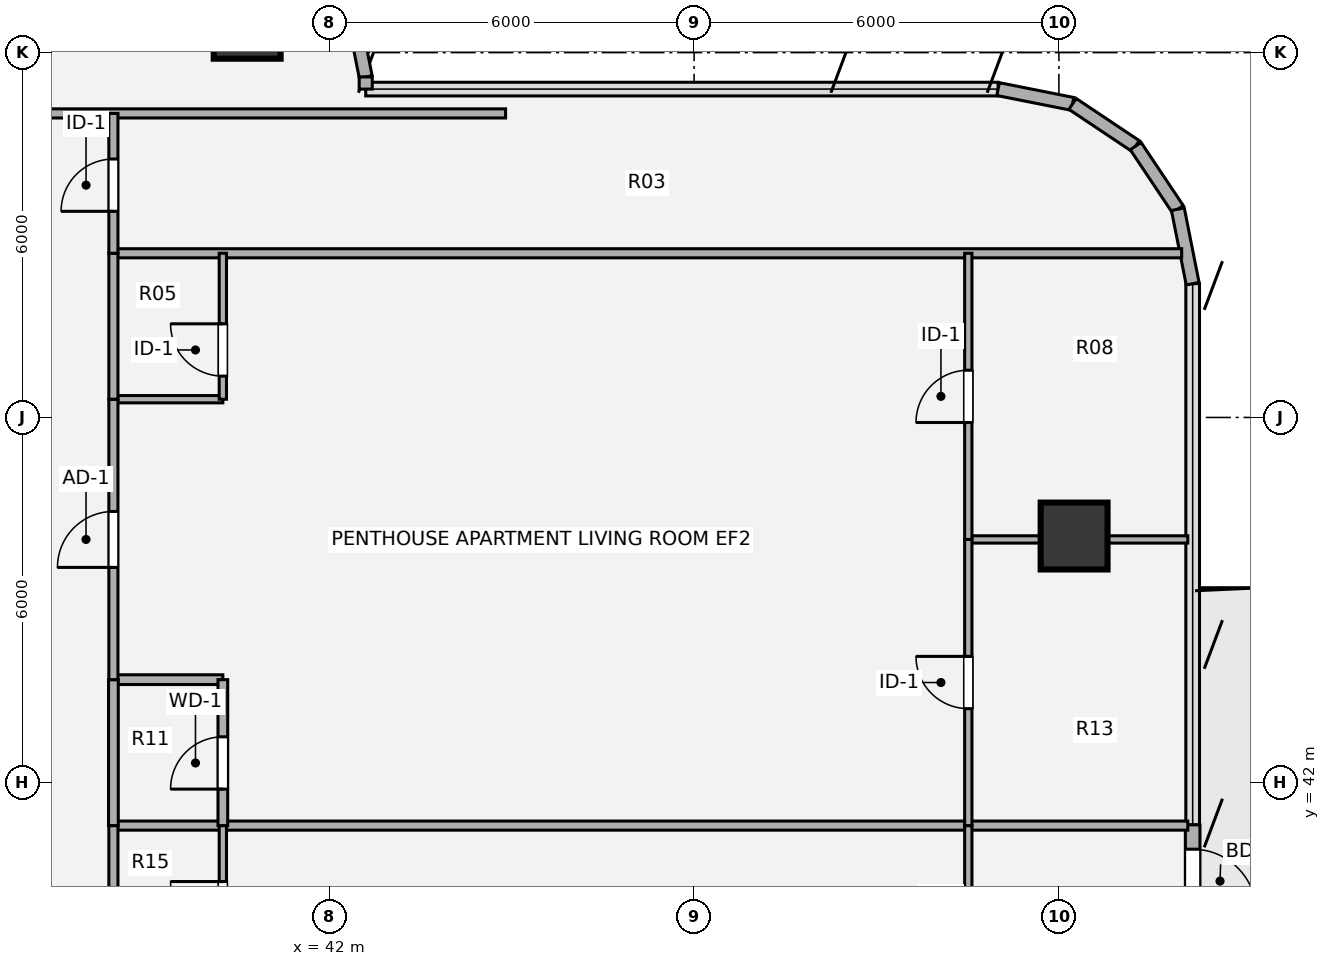
"""IFC4 building model, lengths in metres.
Left out: names, types, materials, properties, quantities, classifications, styles, units other than length and angle.
Written with IfcOpenShell. Run it as: python <this file> out.ifc"""

import sys

from ifc_helpers import new_model, si_unit, direction, frame, frame_2d, origin, origin_2d, place, context, subcontext, project, spatial, rectangle, hollow_circle, extrude, source, transform, mapped, element, fill, save


model = new_model("IFC4")
c1 = context("Model", 3, precision=1e-05, world=origin(), true_north=direction((0.0, 1.0)))
c2 = subcontext(c1, "Body", "Model", "MODEL_VIEW")
j1 = project(units=[si_unit("LENGTHUNIT", "METRE"), si_unit("PLANEANGLEUNIT", "RADIAN")], contexts=[c1])
p1 = place(None, origin())
s1 = spatial("IfcSite", under=j1, at=p1, CompositionType="ELEMENT")
p2 = place(p1, origin())
s2 = spatial("IfcBuilding", under=s1, at=p2, CompositionType="ELEMENT")
p3 = place(p2, frame((0.0, 0.0, 156.42)))
s3 = spatial("IfcBuildingStorey", under=s2, at=p3, CompositionType="ELEMENT", Elevation=156.42)
m1 = source(origin(), c2, "Body", "SweptSolid", [
    extrude(hollow_circle(Radius=0.55, WallThickness=0.04, at=origin_2d()), origin(), (0.0, 0.0, 1.0), 3.78),
])
for number, where, z_axis, x_axis in (
    (1, (54.25, 46.05, 0.0), (0.0, 0.0, 1.0), (1.0, 0.0, 0.0)),
    (2, (40.65, 54.45, 0.0), (0.0, 0.0, 1.0), (1.0, 0.0, 0.0)),
):
    element("IfcColumn", number, at=place(p3, frame(where, z_axis=z_axis, x_axis=x_axis)), inside=s3, PredefinedType="COLUMN", context=c2, shape_type="MappedRepresentation", body=[
        mapped(m1, transform((0.0, 0.0, 0.0), x_axis=(1.0, 0.0, 0.0), y_axis=(0.0, 1.0, 0.0), z_axis=(0.0, 0.0, 1.0), scale=1.0)),
    ])
p4 = place(p3, frame((42.387, 54.671, 0.0), z_axis=(0.0, 0.0, 1.0), x_axis=(0.195127417394, -0.980777900945, 0.0)))
e3 = element("IfcWall", 3, at=p4, inside=s3, PredefinedType="SOLIDWALL", context=c2, shape_type="SweptSolid", body=[
    extrude(rectangle(XDim=1.092, YDim=0.215, at=frame_2d((0.546, 0.0))), origin(), (0.0, 0.0, 1.0), 3.53),
])
p5 = place(p3, frame((42.6, 53.6, 0.0), z_axis=(0.0, 0.0, 1.0), x_axis=(0.0, -1.0, 0.0)))
e4 = element("IfcWall", 4, at=p5, inside=s3, PredefinedType="SOLIDWALL", context=c2, shape_type="SweptSolid", body=[
    extrude(rectangle(XDim=0.2, YDim=0.215, at=frame_2d((0.1, 0.0))), origin(), (0.0, 0.0, 1.0), 3.53),
])
for number, where, z_axis, x_axis in (
    (5, (53.0, 53.4, 0.0), (0.0, 0.0, 1.0), (0.981, -0.195, 0.0)),
    (6, (54.225, 53.156, 0.0), (0.0, 0.0, 1.0), (0.831, -0.556, 0.0)),
    (7, (55.263, 52.463, 0.0), (0.0, 0.0, 1.0), (0.556, -0.831, 0.0)),
    (8, (55.956, 51.425, 0.0), (0.0, 0.0, 1.0), (0.195, -0.981, 0.0)),
):
    element("IfcWall", number, at=place(p3, frame(where, z_axis=z_axis, x_axis=x_axis)), inside=s3, PredefinedType="SOLIDWALL", context=c2, shape_type="SweptSolid", body=[
        extrude(rectangle(XDim=1.249, YDim=0.215, at=frame_2d((0.624, 0.0))), origin(), (0.0, 0.0, 1.0), 3.53),
    ])
p6 = place(p3, frame((56.2, 41.3, 0.0), z_axis=(0.0, 0.0, 1.0), x_axis=(0.0, -1.0, 0.0)))
e9 = element("IfcWall", 9, at=p6, inside=s3, PredefinedType="SOLIDWALL", context=c2, shape_type="SweptSolid", body=[
    extrude(rectangle(XDim=3.6, YDim=0.24, at=frame_2d((1.8, 0.0))), origin(), (0.0, 0.0, 1.0), 3.53),
])
p7 = place(p6, frame((0.4, 0.0, 0.0)))
e10 = element("IfcOpeningElement", 10, at=p7, cuts=e9, PredefinedType="OPENING", context=c2, shape_type="SweptSolid", body=[
    extrude(rectangle(XDim=1.05, YDim=2.15, at=origin_2d()), frame((0.525, 0.13, 1.075), z_axis=(0.0, -1.0, 0.0), x_axis=(1.0, 0.0, 0.0)), (0.0, 0.0, 1.0), 0.26),
])
p8 = place(p6, frame((1.85, 0.0, 0.85)))
e11 = element("IfcOpeningElement", 11, at=p8, cuts=e9, PredefinedType="OPENING", context=c2, shape_type="SweptSolid", body=[
    extrude(rectangle(XDim=1.35, YDim=1.35, at=origin_2d()), frame((0.675, 0.13, 0.675), z_axis=(0.0, -1.0, 0.0), x_axis=(1.0, 0.0, 0.0)), (0.0, 0.0, 1.0), 0.26),
])
p9 = place(p3, frame((38.45, 41.288, 0.0), z_axis=(0.0, 0.0, 1.0), x_axis=(1.0, 0.0, 0.0)))
e12 = element("IfcWall", 12, at=p9, inside=s3, PredefinedType="PARTITIONING", context=c2, shape_type="SweptSolid", body=[
    extrude(rectangle(XDim=17.67, YDim=0.15, at=frame_2d((8.835, 0.0))), origin(), (0.0, 0.0, 1.0), 2.982),
])
p10 = place(p3, frame((38.45, 43.688, 0.0), z_axis=(0.0, 0.0, 1.0), x_axis=(1.0, 0.0, 0.0)))
e13 = element("IfcWall", 13, at=p10, inside=s3, PredefinedType="PLUMBINGWALL", context=c2, shape_type="SweptSolid", body=[
    extrude(rectangle(XDim=1.8, YDim=0.16, at=frame_2d((0.9, 0.0))), origin(), (0.0, 0.0, 1.0), 3.259),
])
p11 = place(p3, frame((52.51, 45.994, 0.0), z_axis=(0.0, 0.0, 1.0), x_axis=(1.0, 0.0, 0.0)))
e14 = element("IfcWall", 14, at=p11, inside=s3, PredefinedType="PARTITIONING", context=c2, shape_type="SweptSolid", body=[
    extrude(rectangle(XDim=3.61, YDim=0.12, at=frame_2d((1.805, 0.0))), origin(), (0.0, 0.0, 1.0), 2.903),
])
p12 = place(p3, frame((38.45, 48.3, 0.0), z_axis=(0.0, 0.0, 1.0), x_axis=(1.0, 0.0, 0.0)))
e15 = element("IfcWall", 15, at=p12, inside=s3, PredefinedType="PARTITIONING", context=c2, shape_type="SweptSolid", body=[
    extrude(rectangle(XDim=1.8, YDim=0.12, at=frame_2d((0.9, 0.0))), origin(), (0.0, 0.0, 1.0), 3.259),
])
p13 = place(p3, frame((38.45, 50.7, 0.0), z_axis=(0.0, 0.0, 1.0), x_axis=(1.0, 0.0, 0.0)))
e16 = element("IfcWall", 16, at=p13, inside=s3, PredefinedType="PARTITIONING", context=c2, shape_type="SweptSolid", body=[
    extrude(rectangle(XDim=17.569, YDim=0.15, at=frame_2d((8.785, 0.0))), origin(), (0.0, 0.0, 1.0), 3.308),
])
p14 = place(p3, frame((27.1, 53.0, 0.0), z_axis=(0.0, 0.0, 1.0), x_axis=(1.0, 0.0, 0.0)))
e17 = element("IfcWall", 17, at=p14, inside=s3, PredefinedType="PARTITIONING", context=c2, shape_type="SweptSolid", body=[
    extrude(rectangle(XDim=17.8, YDim=0.15, at=frame_2d((8.9, 0.0))), origin(), (0.0, 0.0, 1.0), 3.308),
])
p15 = place(p14, frame((8.375, 0.0, 0.0)))
e18 = element("IfcOpeningElement", 18, at=p15, cuts=e17, PredefinedType="OPENING", context=c2, shape_type="SweptSolid", body=[
    extrude(rectangle(XDim=1.05, YDim=2.1, at=origin_2d()), frame((0.525, 0.085, 1.05), z_axis=(0.0, -1.0, 0.0), x_axis=(1.0, 0.0, 0.0)), (0.0, 0.0, 1.0), 0.17),
])
p16 = place(p3, frame((38.45, 38.888, 0.0), z_axis=(0.0, 0.0, 1.0), x_axis=(0.0, 1.0, 0.0)))
e19 = element("IfcWall", 19, at=p16, inside=s3, PredefinedType="PARTITIONING", context=c2, shape_type="SweptSolid", body=[
    extrude(rectangle(XDim=2.4, YDim=0.15, at=frame_2d((1.2, 0.0))), origin(), (0.0, 0.0, 1.0), 3.5),
])
p17 = place(p3, frame((38.45, 41.288, 0.0), z_axis=(0.0, 0.0, 1.0), x_axis=(0.0, 1.0, 0.0)))
e20 = element("IfcWall", 20, at=p17, inside=s3, PredefinedType="PLUMBINGWALL", context=c2, shape_type="SweptSolid", body=[
    extrude(rectangle(XDim=2.4, YDim=0.16, at=frame_2d((1.2, 0.0))), origin(), (0.0, 0.0, 1.0), 3.5),
])
p18 = place(p3, frame((38.45, 43.688, 0.0), z_axis=(0.0, 0.0, 1.0), x_axis=(0.0, 1.0, 0.0)))
e21 = element("IfcWall", 21, at=p18, inside=s3, PredefinedType="PARTITIONING", context=c2, shape_type="SweptSolid", body=[
    extrude(rectangle(XDim=4.612, YDim=0.15, at=frame_2d((2.306, 0.0))), origin(), (0.0, 0.0, 1.0), 3.5),
])
p19 = place(p18, frame((1.846, 0.0, 0.0)))
e22 = element("IfcOpeningElement", 22, at=p19, cuts=e21, PredefinedType="OPENING", context=c2, shape_type="SweptSolid", body=[
    extrude(rectangle(XDim=0.92, YDim=2.1, at=origin_2d()), frame((0.46, 0.085, 1.05), z_axis=(0.0, -1.0, 0.0), x_axis=(1.0, 0.0, 0.0)), (0.0, 0.0, 1.0), 0.17),
])
p20 = place(p3, frame((38.45, 48.3, 0.0), z_axis=(0.0, 0.0, 1.0), x_axis=(0.0, 1.0, 0.0)))
e23 = element("IfcWall", 23, at=p20, inside=s3, PredefinedType="PARTITIONING", context=c2, shape_type="SweptSolid", body=[
    extrude(rectangle(XDim=2.4, YDim=0.15, at=frame_2d((1.2, 0.0))), origin(), (0.0, 0.0, 1.0), 3.5),
])
p21 = place(p3, frame((38.45, 50.7, 0.0), z_axis=(0.0, 0.0, 1.0), x_axis=(0.0, 1.0, 0.0)))
e24 = element("IfcWall", 24, at=p21, inside=s3, PredefinedType="PARTITIONING", context=c2, shape_type="SweptSolid", body=[
    extrude(rectangle(XDim=2.3, YDim=0.15, at=frame_2d((1.15, 0.0))), origin(), (0.0, 0.0, 1.0), 3.5),
])
p22 = place(p21, frame((0.69, 0.0, 0.0)))
e25 = element("IfcOpeningElement", 25, at=p22, cuts=e24, PredefinedType="OPENING", context=c2, shape_type="SweptSolid", body=[
    extrude(rectangle(XDim=0.86, YDim=2.1, at=origin_2d()), frame((0.43, 0.085, 1.05), z_axis=(0.0, -1.0, 0.0), x_axis=(1.0, 0.0, 0.0)), (0.0, 0.0, 1.0), 0.17),
])
p23 = place(p3, frame((40.25, 38.888, 0.0), z_axis=(0.0, 0.0, 1.0), x_axis=(0.0, 1.0, 0.0)))
e26 = element("IfcWall", 26, at=p23, inside=s3, PredefinedType="PARTITIONING", context=c2, shape_type="SweptSolid", body=[
    extrude(rectangle(XDim=2.4, YDim=0.12, at=frame_2d((1.2, 0.0))), origin(), (0.0, 0.0, 1.0), 3.5),
])
p24 = place(p23, frame((0.62, 0.0, 0.0)))
e27 = element("IfcOpeningElement", 27, at=p24, cuts=e26, PredefinedType="OPENING", context=c2, shape_type="SweptSolid", body=[
    extrude(rectangle(XDim=0.86, YDim=2.1, at=origin_2d()), frame((0.43, 0.07, 1.05), z_axis=(0.0, -1.0, 0.0), x_axis=(1.0, 0.0, 0.0)), (0.0, 0.0, 1.0), 0.14),
])
p25 = place(p3, frame((40.25, 41.288, 0.0), z_axis=(0.0, 0.0, 1.0), x_axis=(0.0, 1.0, 0.0)))
e28 = element("IfcWall", 28, at=p25, inside=s3, PredefinedType="PLUMBINGWALL", context=c2, shape_type="SweptSolid", body=[
    extrude(rectangle(XDim=2.4, YDim=0.16, at=frame_2d((1.2, 0.0))), origin(), (0.0, 0.0, 1.0), 3.5),
])
p26 = place(p25, frame((0.6, 0.0, 0.0)))
e29 = element("IfcOpeningElement", 29, at=p26, cuts=e28, PredefinedType="OPENING", context=c2, shape_type="SweptSolid", body=[
    extrude(rectangle(XDim=0.86, YDim=2.1, at=origin_2d()), frame((0.43, 0.09, 1.05), z_axis=(0.0, -1.0, 0.0), x_axis=(1.0, 0.0, 0.0)), (0.0, 0.0, 1.0), 0.18),
])
p27 = place(p3, frame((40.25, 48.3, 0.0), z_axis=(0.0, 0.0, 1.0), x_axis=(0.0, 1.0, 0.0)))
e30 = element("IfcWall", 30, at=p27, inside=s3, PredefinedType="PARTITIONING", context=c2, shape_type="SweptSolid", body=[
    extrude(rectangle(XDim=2.4, YDim=0.12, at=frame_2d((1.2, 0.0))), origin(), (0.0, 0.0, 1.0), 3.5),
])
p28 = place(p27, frame((0.38, 0.0, 0.0)))
e31 = element("IfcOpeningElement", 31, at=p28, cuts=e30, PredefinedType="OPENING", context=c2, shape_type="SweptSolid", body=[
    extrude(rectangle(XDim=0.86, YDim=2.1, at=origin_2d()), frame((0.43, 0.07, 1.05), z_axis=(0.0, -1.0, 0.0), x_axis=(1.0, 0.0, 0.0)), (0.0, 0.0, 1.0), 0.14),
])
p29 = place(p3, frame((52.51, 36.944, 0.0), z_axis=(0.0, 0.0, 1.0), x_axis=(0.0, 1.0, 0.0)))
e32 = element("IfcWall", 32, at=p29, inside=s3, PredefinedType="PARTITIONING", context=c2, shape_type="SweptSolid", body=[
    extrude(rectangle(XDim=4.344, YDim=0.12, at=frame_2d((2.172, 0.0))), origin(), (0.0, 0.0, 1.0), 3.5),
])
p30 = place(p29, frame((1.742, 0.0, 0.0)))
e33 = element("IfcOpeningElement", 33, at=p30, cuts=e32, PredefinedType="OPENING", context=c2, shape_type="SweptSolid", body=[
    extrude(rectangle(XDim=0.86, YDim=2.1, at=origin_2d()), frame((0.43, 0.07, 1.05), z_axis=(0.0, -1.0, 0.0), x_axis=(1.0, 0.0, 0.0)), (0.0, 0.0, 1.0), 0.14),
])
p31 = place(p3, frame((52.51, 41.288, 0.0), z_axis=(0.0, 0.0, 1.0), x_axis=(0.0, 1.0, 0.0)))
e34 = element("IfcWall", 34, at=p31, inside=s3, PredefinedType="PARTITIONING", context=c2, shape_type="SweptSolid", body=[
    extrude(rectangle(XDim=4.706, YDim=0.12, at=frame_2d((2.353, 0.0))), origin(), (0.0, 0.0, 1.0), 3.5),
])
p32 = place(p31, frame((1.923, 0.0, 0.0)))
e35 = element("IfcOpeningElement", 35, at=p32, cuts=e34, PredefinedType="OPENING", context=c2, shape_type="SweptSolid", body=[
    extrude(rectangle(XDim=0.86, YDim=2.1, at=origin_2d()), frame((0.43, 0.07, 1.05), z_axis=(0.0, -1.0, 0.0), x_axis=(1.0, 0.0, 0.0)), (0.0, 0.0, 1.0), 0.14),
])
p33 = place(p3, frame((52.51, 45.994, 0.0), z_axis=(0.0, 0.0, 1.0), x_axis=(0.0, 1.0, 0.0)))
e36 = element("IfcWall", 36, at=p33, inside=s3, PredefinedType="PARTITIONING", context=c2, shape_type="SweptSolid", body=[
    extrude(rectangle(XDim=4.706, YDim=0.12, at=frame_2d((2.353, 0.0))), origin(), (0.0, 0.0, 1.0), 3.5),
])
p34 = place(p33, frame((1.923, 0.0, 0.0)))
e37 = element("IfcOpeningElement", 37, at=p34, cuts=e36, PredefinedType="OPENING", context=c2, shape_type="SweptSolid", body=[
    extrude(rectangle(XDim=0.86, YDim=2.1, at=origin_2d()), frame((0.43, 0.07, 1.05), z_axis=(0.0, -1.0, 0.0), x_axis=(1.0, 0.0, 0.0)), (0.0, 0.0, 1.0), 0.14),
])
m2 = source(origin(), c2, "Body", "SweptSolid", [
    extrude(rectangle(XDim=1.05, YDim=2.15, at=origin_2d()), frame((0.525, 0.025, 1.075), z_axis=(0.0, -1.0, 0.0), x_axis=(1.0, 0.0, 0.0)), (0.0, 0.0, 1.0), 0.05),
])
p35 = place(p7, origin())
e38 = element("IfcDoor", 38, at=p35, inside=s3, OperationType="SINGLE_SWING_RIGHT", PredefinedType="DOOR", context=c2, shape_type="MappedRepresentation", body=[
    mapped(m2, transform((0.0, 0.0, 0.0), x_axis=(1.0, 0.0, 0.0), y_axis=(0.0, 1.0, 0.0), z_axis=(0.0, 0.0, 1.0), scale=1.0)),
])
fill(e10, e38)
m3 = source(origin(), c2, "Body", "SweptSolid", [
    extrude(rectangle(XDim=0.92, YDim=2.1, at=origin_2d()), frame((0.46, 0.025, 1.05), z_axis=(0.0, -1.0, 0.0), x_axis=(1.0, 0.0, 0.0)), (0.0, 0.0, 1.0), 0.05),
])
p36 = place(p19, origin())
e39 = element("IfcDoor", 39, at=p36, inside=s3, OperationType="SINGLE_SWING_LEFT", PredefinedType="DOOR", context=c2, shape_type="MappedRepresentation", body=[
    mapped(m3, transform((0.0, 0.0, 0.0), x_axis=(1.0, 0.0, 0.0), y_axis=(0.0, 1.0, 0.0), z_axis=(0.0, 0.0, 1.0), scale=1.0)),
])
fill(e22, e39)
m4 = source(origin(), c2, "Body", "SweptSolid", [
    extrude(rectangle(XDim=0.86, YDim=2.1, at=origin_2d()), frame((0.43, 0.025, 1.05), z_axis=(0.0, -1.0, 0.0), x_axis=(1.0, 0.0, 0.0)), (0.0, 0.0, 1.0), 0.05),
])
p37 = place(p22, origin())
e40 = element("IfcDoor", 40, at=p37, inside=s3, OperationType="SINGLE_SWING_LEFT", PredefinedType="DOOR", context=c2, shape_type="MappedRepresentation", body=[
    mapped(m4, transform((0.0, 0.0, 0.0), x_axis=(1.0, 0.0, 0.0), y_axis=(0.0, 1.0, 0.0), z_axis=(0.0, 0.0, 1.0), scale=1.0)),
])
fill(e25, e40)
p38 = place(p24, origin())
e41 = element("IfcDoor", 41, at=p38, inside=s3, OperationType="SINGLE_SWING_RIGHT", PredefinedType="DOOR", context=c2, shape_type="MappedRepresentation", body=[
    mapped(m4, transform((0.0, 0.0, 0.0), x_axis=(1.0, 0.0, 0.0), y_axis=(0.0, 1.0, 0.0), z_axis=(0.0, 0.0, 1.0), scale=1.0)),
])
fill(e27, e41)
m5 = source(origin(), c2, "Body", "SweptSolid", [
    extrude(rectangle(XDim=0.86, YDim=2.1, at=origin_2d()), frame((0.43, 0.025, 1.05), z_axis=(0.0, -1.0, 0.0), x_axis=(1.0, 0.0, 0.0)), (0.0, 0.0, 1.0), 0.05),
])
p39 = place(p26, origin())
e42 = element("IfcDoor", 42, at=p39, inside=s3, OperationType="SINGLE_SWING_LEFT", PredefinedType="DOOR", context=c2, shape_type="MappedRepresentation", body=[
    mapped(m5, transform((0.0, 0.0, 0.0), x_axis=(1.0, 0.0, 0.0), y_axis=(0.0, 1.0, 0.0), z_axis=(0.0, 0.0, 1.0), scale=1.0)),
])
fill(e29, e42)
p40 = place(p28, origin())
e43 = element("IfcDoor", 43, at=p40, inside=s3, OperationType="SINGLE_SWING_RIGHT", PredefinedType="DOOR", context=c2, shape_type="MappedRepresentation", body=[
    mapped(m4, transform((0.0, 0.0, 0.0), x_axis=(1.0, 0.0, 0.0), y_axis=(0.0, 1.0, 0.0), z_axis=(0.0, 0.0, 1.0), scale=1.0)),
])
fill(e31, e43)
p41 = place(p32, origin())
e44 = element("IfcDoor", 44, at=p41, inside=s3, OperationType="SINGLE_SWING_RIGHT", PredefinedType="DOOR", context=c2, shape_type="MappedRepresentation", body=[
    mapped(m4, transform((0.0, 0.0, 0.0), x_axis=(1.0, 0.0, 0.0), y_axis=(0.0, 1.0, 0.0), z_axis=(0.0, 0.0, 1.0), scale=1.0)),
])
fill(e35, e44)
p42 = place(p34, origin())
e45 = element("IfcDoor", 45, at=p42, inside=s3, OperationType="SINGLE_SWING_LEFT", PredefinedType="DOOR", context=c2, shape_type="MappedRepresentation", body=[
    mapped(m4, transform((0.0, 0.0, 0.0), x_axis=(1.0, 0.0, 0.0), y_axis=(0.0, 1.0, 0.0), z_axis=(0.0, 0.0, 1.0), scale=1.0)),
])
fill(e37, e45)
save(model, sys.argv[1])
